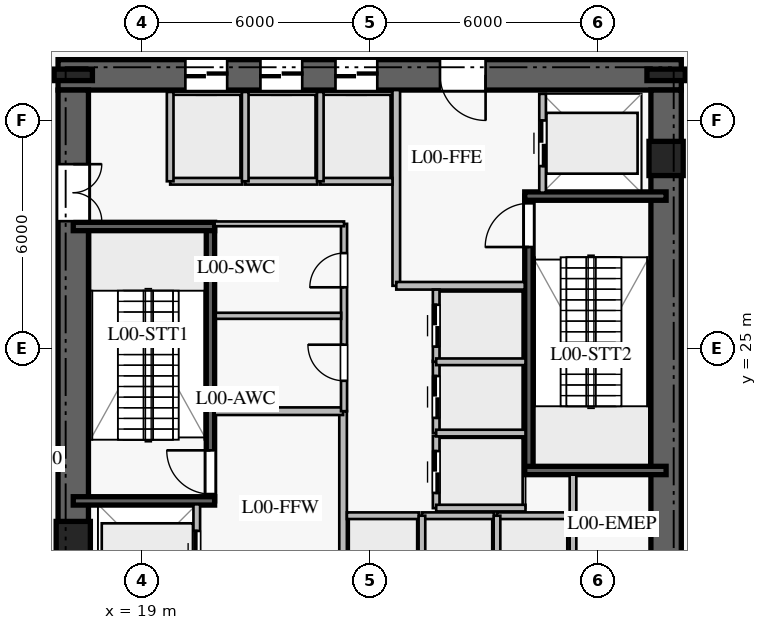
"""IFC4 building model, lengths in metres.
Left out: names, types, materials, properties, quantities, classifications, styles, units other than length and angle.
Written with IfcOpenShell. Run it as: python <this file> out.ifc"""

import sys

from ifc_helpers import new_model, si_unit, direction, frame, frame_2d, origin, origin_2d, place, context, subcontext, project, spatial, rectangle, i_section, extrude, element, fill, save


model = new_model("IFC4")
c1 = context("Model", 3, precision=1e-05, world=origin(), true_north=direction((0.0, 1.0)))
c2 = subcontext(c1, "Body", "Model", "MODEL_VIEW")
j1 = project(units=[si_unit("LENGTHUNIT", "METRE"), si_unit("PLANEANGLEUNIT", "RADIAN")], contexts=[c1])
p1 = place(None, origin())
s1 = spatial("IfcSite", under=j1, at=p1, CompositionType="ELEMENT")
p2 = place(p1, origin())
s2 = spatial("IfcBuilding", under=s1, at=p2, CompositionType="ELEMENT")
p3 = place(p2, origin())
s3 = spatial("IfcBuildingStorey", under=s2, at=p3, CompositionType="ELEMENT", Elevation=0.0)
p4 = place(p3, frame((33.2, 32.2, 0.0), z_axis=(0.0, 0.0, 1.0), x_axis=(-1.0, 0.0, 0.0)))
e1 = element("IfcWall", 1, at=p4, inside=s3, PredefinedType="SHEAR", context=c2, shape_type="SweptSolid", body=[
    extrude(rectangle(XDim=16.4, YDim=0.8, at=frame_2d((8.2, 0.0))), origin(), (0.0, 0.0, 1.0), 4.94),
])
p5 = place(p4, frame((5.15, 0.0, 0.0)))
e2 = element("IfcOpeningElement", 2, at=p5, cuts=e1, PredefinedType="OPENING", context=c2, shape_type="SweptSolid", body=[
    extrude(rectangle(XDim=1.2, YDim=2.25, at=frame_2d((0.6, 1.125))), frame((0.0, 0.41, 0.0), z_axis=(0.0, -1.0, 0.0), x_axis=(1.0, 0.0, 0.0)), (0.0, 0.0, 1.0), 0.82),
])
p6 = place(p4, frame((11.95, 0.0, 0.0)))
e3 = element("IfcOpeningElement", 3, at=p6, cuts=e1, PredefinedType="OPENING", context=c2, shape_type="SweptSolid", body=[
    extrude(rectangle(XDim=1.1, YDim=2.2, at=frame_2d((0.55, 1.1))), frame((0.0, 0.41, 0.0), z_axis=(0.0, -1.0, 0.0), x_axis=(1.0, 0.0, 0.0)), (0.0, 0.0, 1.0), 0.82),
])
p7 = place(p4, frame((9.975, 0.0, 0.0)))
e4 = element("IfcOpeningElement", 4, at=p7, cuts=e1, PredefinedType="OPENING", context=c2, shape_type="SweptSolid", body=[
    extrude(rectangle(XDim=1.1, YDim=2.2, at=frame_2d((0.55, 1.1))), frame((0.0, 0.41, 0.0), z_axis=(0.0, -1.0, 0.0), x_axis=(1.0, 0.0, 0.0)), (0.0, 0.0, 1.0), 0.82),
])
p8 = place(p4, frame((8.0, 0.0, 0.0)))
e5 = element("IfcOpeningElement", 5, at=p8, cuts=e1, PredefinedType="OPENING", context=c2, shape_type="SweptSolid", body=[
    extrude(rectangle(XDim=1.1, YDim=2.2, at=frame_2d((0.55, 1.1))), frame((0.0, 0.41, 0.0), z_axis=(0.0, -1.0, 0.0), x_axis=(1.0, 0.0, 0.0)), (0.0, 0.0, 1.0), 0.82),
])
p9 = place(p3, frame((17.2, 31.8, 0.0), z_axis=(0.0, 0.0, 1.0), x_axis=(0.0, -1.0, 0.0)))
e6 = element("IfcWall", 6, at=p9, inside=s3, PredefinedType="SHEAR", context=c2, shape_type="SweptSolid", body=[
    extrude(rectangle(XDim=13.6, YDim=0.8, at=frame_2d((6.8, 0.0))), origin(), (0.0, 0.0, 1.0), 4.94),
])
p10 = place(p9, frame((1.95, 0.0, 0.0)))
e7 = element("IfcOpeningElement", 7, at=p10, cuts=e6, PredefinedType="OPENING", context=c2, shape_type="SweptSolid", body=[
    extrude(rectangle(XDim=1.5, YDim=2.2, at=frame_2d((0.75, 1.1))), frame((0.0, 0.41, 0.0), z_axis=(0.0, -1.0, 0.0), x_axis=(1.0, 0.0, 0.0)), (0.0, 0.0, 1.0), 0.82),
])
p11 = place(p3, frame((32.8, 18.2, 0.0), z_axis=(0.0, 0.0, 1.0), x_axis=(0.0, 1.0, 0.0)))
e8 = element("IfcWall", 8, at=p11, inside=s3, PredefinedType="SHEAR", context=c2, shape_type="SweptSolid", body=[
    extrude(rectangle(XDim=13.6, YDim=0.8, at=frame_2d((6.8, 0.0))), origin(), (0.0, 0.0, 1.0), 4.94),
])
for number, where, z_axis, x_axis in (
    (9, (32.8, 32.2, 0.0), (0.0, 0.0, 1.0), (1.0, 0.0, 0.0)),
    (10, (17.2, 32.2, 0.0), (0.0, 0.0, 1.0), (1.0, 0.0, 0.0)),
):
    element("IfcColumn", number, at=place(p3, frame(where, z_axis=z_axis, x_axis=x_axis)), inside=s3, PredefinedType="COLUMN", context=c2, shape_type="SweptSolid", body=[
        extrude(i_section(OverallWidth=0.302, OverallDepth=1.008, WebThickness=0.021, FlangeThickness=0.04, at=origin_2d()), origin(), (0.0, 0.0, 1.0), 5.2),
    ])
p12 = place(p3, frame((20.81, 20.99, 0.0), z_axis=(0.0, 0.0, 1.0), x_axis=(0.0, 1.0, 0.0)))
e11 = element("IfcWall", 11, at=p12, inside=s3, PredefinedType="SOLIDWALL", context=c2, shape_type="SweptSolid", body=[
    extrude(rectangle(XDim=7.22, YDim=0.22, at=frame_2d((3.61, 0.0))), origin(), (0.0, 0.0, 1.0), 4.94),
])
p13 = place(p12, frame((0.18, 0.0, 0.0)))
e12 = element("IfcOpeningElement", 12, at=p13, cuts=e11, PredefinedType="OPENING", context=c2, shape_type="SweptSolid", body=[
    extrude(rectangle(XDim=1.15, YDim=2.2, at=frame_2d((0.575, 1.1))), frame((0.0, 0.12, 0.0), z_axis=(0.0, -1.0, 0.0), x_axis=(1.0, 0.0, 0.0)), (0.0, 0.0, 1.0), 0.24),
])
for number, where, z_axis, x_axis in (
    (13, (17.2, 20.99, 0.0), (0.0, 0.0, 1.0), (1.0, 0.0, 0.0)),
    (14, (17.2, 28.21, 0.0), (0.0, 0.0, 1.0), (1.0, 0.0, 0.0)),
):
    element("IfcWall", number, at=place(p3, frame(where, z_axis=z_axis, x_axis=x_axis)), inside=s3, PredefinedType="SOLIDWALL", context=c2, shape_type="SweptSolid", body=[
        extrude(rectangle(XDim=3.72, YDim=0.22, at=frame_2d((1.86, 0.0))), origin(), (0.0, 0.0, 1.0), 4.94),
    ])
p14 = place(p3, frame((29.19, 21.79, 0.0), z_axis=(0.0, 0.0, 1.0), x_axis=(0.0, 1.0, 0.0)))
e15 = element("IfcWall", 15, at=p14, inside=s3, PredefinedType="SOLIDWALL", context=c2, shape_type="SweptSolid", body=[
    extrude(rectangle(XDim=7.22, YDim=0.22, at=frame_2d((3.61, 0.0))), origin(), (0.0, 0.0, 1.0), 4.94),
])
p15 = place(p14, frame((5.88, 0.0, 0.0)))
e16 = element("IfcOpeningElement", 16, at=p15, cuts=e15, PredefinedType="OPENING", context=c2, shape_type="SweptSolid", body=[
    extrude(rectangle(XDim=1.15, YDim=2.2, at=frame_2d((0.575, 1.1))), frame((0.0, 0.12, 0.0), z_axis=(0.0, -1.0, 0.0), x_axis=(1.0, 0.0, 0.0)), (0.0, 0.0, 1.0), 0.24),
])
for number, where, z_axis, x_axis in (
    (17, (29.08, 21.79, 0.0), (0.0, 0.0, 1.0), (1.0, 0.0, 0.0)),
    (18, (29.08, 29.01, 0.0), (0.0, 0.0, 1.0), (1.0, 0.0, 0.0)),
):
    element("IfcWall", number, at=place(p3, frame(where, z_axis=z_axis, x_axis=x_axis)), inside=s3, PredefinedType="SOLIDWALL", context=c2, shape_type="SweptSolid", body=[
        extrude(rectangle(XDim=3.72, YDim=0.22, at=frame_2d((1.86, 0.0))), origin(), (0.0, 0.0, 1.0), 4.94),
    ])
for number, where, z_axis, x_axis in (
    (19, (17.2, 20.0, 0.0), (0.0, 0.0, 1.0), (1.0, 0.0, 0.0)),
    (20, (32.8, 30.0, 0.0), (0.0, 0.0, 1.0), (1.0, 0.0, 0.0)),
):
    element("IfcColumn", number, at=place(p3, frame(where, z_axis=z_axis, x_axis=x_axis)), inside=s3, PredefinedType="PILASTER", context=c2, shape_type="SweptSolid", body=[
        extrude(rectangle(XDim=0.9, YDim=0.9, at=origin_2d()), origin(), (0.0, 0.0, 1.0), 5.2),
    ])
p16 = place(p3, frame((24.3, 18.2, 0.0), z_axis=(0.0, 0.0, 1.0), x_axis=(0.0, 1.0, 0.0)))
e21 = element("IfcWall", 21, at=p16, inside=s3, PredefinedType="PARTITIONING", context=c2, shape_type="SweptSolid", body=[
    extrude(rectangle(XDim=5.15, YDim=0.2, at=frame_2d((2.575, 0.0))), origin(), (0.0, 0.0, 1.0), 4.94),
])
p17 = place(p3, frame((20.92, 23.35, 0.0), z_axis=(0.0, 0.0, 1.0), x_axis=(1.0, 0.0, 0.0)))
e22 = element("IfcWall", 22, at=p17, inside=s3, PredefinedType="PARTITIONING", context=c2, shape_type="SweptSolid", body=[
    extrude(rectangle(XDim=3.38, YDim=0.2, at=frame_2d((1.69, 0.0))), origin(), (0.0, 0.0, 1.0), 4.94),
])
p18 = place(p3, frame((25.7, 26.65, 0.0), z_axis=(0.0, 0.0, 1.0), x_axis=(0.0, 1.0, 0.0)))
e23 = element("IfcWall", 23, at=p18, inside=s3, PredefinedType="PARTITIONING", context=c2, shape_type="SweptSolid", body=[
    extrude(rectangle(XDim=5.15, YDim=0.2, at=frame_2d((2.575, 0.0))), origin(), (0.0, 0.0, 1.0), 4.94),
])
p19 = place(p3, frame((25.7, 26.65, 0.0), z_axis=(0.0, 0.0, 1.0), x_axis=(1.0, 0.0, 0.0)))
e24 = element("IfcWall", 24, at=p19, inside=s3, PredefinedType="PARTITIONING", context=c2, shape_type="SweptSolid", body=[
    extrude(rectangle(XDim=3.38, YDim=0.2, at=frame_2d((1.69, 0.0))), origin(), (0.0, 0.0, 1.0), 4.94),
])
p20 = place(p3, frame((24.325, 23.35, 0.0), z_axis=(0.0, 0.0, 1.0), x_axis=(0.0, 1.0, 0.0)))
e25 = element("IfcWall", 25, at=p20, inside=s3, PredefinedType="PLUMBINGWALL", context=c2, shape_type="SweptSolid", body=[
    extrude(rectangle(XDim=4.93, YDim=0.16, at=frame_2d((2.465, 0.0))), origin(), (0.0, 0.0, 1.0), 4.94),
])
p21 = place(p20, frame((0.8, 0.0, 0.0)))
e26 = element("IfcOpeningElement", 26, at=p21, cuts=e25, PredefinedType="OPENING", context=c2, shape_type="SweptSolid", body=[
    extrude(rectangle(XDim=0.95, YDim=2.1, at=frame_2d((0.475, 1.05))), frame((0.0, 0.09, 0.0), z_axis=(0.0, -1.0, 0.0), x_axis=(1.0, 0.0, 0.0)), (0.0, 0.0, 1.0), 0.18),
])
p22 = place(p20, frame((3.26, 0.0, 0.0)))
e27 = element("IfcOpeningElement", 27, at=p22, cuts=e25, PredefinedType="OPENING", context=c2, shape_type="SweptSolid", body=[
    extrude(rectangle(XDim=0.9, YDim=2.1, at=frame_2d((0.45, 1.05))), frame((0.0, 0.09, 0.0), z_axis=(0.0, -1.0, 0.0), x_axis=(1.0, 0.0, 0.0)), (0.0, 0.0, 1.0), 0.18),
])
p23 = place(p3, frame((20.92, 28.28, 0.0), z_axis=(0.0, 0.0, 1.0), x_axis=(1.0, 0.0, 0.0)))
e28 = element("IfcWall", 28, at=p23, inside=s3, PredefinedType="PARTITIONING", context=c2, shape_type="SweptSolid", body=[
    extrude(rectangle(XDim=3.405, YDim=0.125, at=frame_2d((1.703, 0.0))), origin(), (0.0, 0.0, 1.0), 4.94),
])
p24 = place(p3, frame((20.95, 25.86, 0.0), z_axis=(0.0, 0.0, 1.0), x_axis=(1.0, 0.0, 0.0)))
e29 = element("IfcWall", 29, at=p24, inside=s3, PredefinedType="PLUMBINGWALL", context=c2, shape_type="SweptSolid", body=[
    extrude(rectangle(XDim=3.3, YDim=0.16, at=frame_2d((1.65, 0.0))), origin(), (0.0, 0.0, 1.0), 4.94),
])
p25 = place(p3, frame((30.35, 18.2, 0.0), z_axis=(0.0, 0.0, 1.0), x_axis=(0.0, 1.0, 0.0)))
e30 = element("IfcWall", 30, at=p25, inside=s3, PredefinedType="PARTITIONING", context=c2, shape_type="SweptSolid", body=[
    extrude(rectangle(XDim=3.48, YDim=0.175, at=frame_2d((1.74, 0.0))), origin(), (0.0, 0.0, 1.0), 4.94),
])
p26 = place(p3, frame((24.4, 20.6, 0.0), z_axis=(0.0, 0.0, 1.0), x_axis=(1.0, 0.0, 0.0)))
e31 = element("IfcWall", 31, at=p26, inside=s3, PredefinedType="PARTITIONING", context=c2, shape_type="SweptSolid", body=[
    extrude(rectangle(XDim=1.9, YDim=0.175, at=frame_2d((0.95, 0.0))), origin(), (0.0, 0.0, 1.0), 4.94),
])
p27 = place(p3, frame((26.375, 20.6, 0.0), z_axis=(0.0, 0.0, 1.0), x_axis=(1.0, 0.0, 0.0)))
e32 = element("IfcWall", 32, at=p27, inside=s3, PredefinedType="PARTITIONING", context=c2, shape_type="SweptSolid", body=[
    extrude(rectangle(XDim=1.9, YDim=0.175, at=frame_2d((0.95, 0.0))), origin(), (0.0, 0.0, 1.0), 4.94),
])
p28 = place(p3, frame((26.375, 18.25, 0.0), z_axis=(0.0, 0.0, 1.0), x_axis=(0.0, 1.0, 0.0)))
e33 = element("IfcWall", 33, at=p28, inside=s3, PredefinedType="PARTITIONING", context=c2, shape_type="SweptSolid", body=[
    extrude(rectangle(XDim=2.35, YDim=0.175, at=frame_2d((1.175, 0.0))), origin(), (0.0, 0.0, 1.0), 4.94),
])
p29 = place(p3, frame((28.35, 20.6, 0.0), z_axis=(0.0, 0.0, 1.0), x_axis=(1.0, 0.0, 0.0)))
e34 = element("IfcWall", 34, at=p29, inside=s3, PredefinedType="PARTITIONING", context=c2, shape_type="SweptSolid", body=[
    extrude(rectangle(XDim=1.9, YDim=0.175, at=frame_2d((0.95, 0.0))), origin(), (0.0, 0.0, 1.0), 4.94),
])
p30 = place(p3, frame((28.35, 18.25, 0.0), z_axis=(0.0, 0.0, 1.0), x_axis=(0.0, 1.0, 0.0)))
e35 = element("IfcWall", 35, at=p30, inside=s3, PredefinedType="PARTITIONING", context=c2, shape_type="SweptSolid", body=[
    extrude(rectangle(XDim=2.35, YDim=0.175, at=frame_2d((1.175, 0.0))), origin(), (0.0, 0.0, 1.0), 4.94),
])
p31 = place(p3, frame((19.75, 29.4, 0.0), z_axis=(0.0, 0.0, 1.0), x_axis=(1.0, 0.0, 0.0)))
e36 = element("IfcWall", 36, at=p31, inside=s3, PredefinedType="PARTITIONING", context=c2, shape_type="SweptSolid", body=[
    extrude(rectangle(XDim=1.9, YDim=0.175, at=frame_2d((0.95, 0.0))), origin(), (0.0, 0.0, 1.0), 4.94),
])
p32 = place(p3, frame((19.75, 29.4, 0.0), z_axis=(0.0, 0.0, 1.0), x_axis=(0.0, 1.0, 0.0)))
e37 = element("IfcWall", 37, at=p32, inside=s3, PredefinedType="PARTITIONING", context=c2, shape_type="SweptSolid", body=[
    extrude(rectangle(XDim=2.35, YDim=0.175, at=frame_2d((1.175, 0.0))), origin(), (0.0, 0.0, 1.0), 4.94),
])
p33 = place(p3, frame((21.725, 29.4, 0.0), z_axis=(0.0, 0.0, 1.0), x_axis=(1.0, 0.0, 0.0)))
e38 = element("IfcWall", 38, at=p33, inside=s3, PredefinedType="PARTITIONING", context=c2, shape_type="SweptSolid", body=[
    extrude(rectangle(XDim=1.9, YDim=0.175, at=frame_2d((0.95, 0.0))), origin(), (0.0, 0.0, 1.0), 4.94),
])
p34 = place(p3, frame((21.725, 29.4, 0.0), z_axis=(0.0, 0.0, 1.0), x_axis=(0.0, 1.0, 0.0)))
e39 = element("IfcWall", 39, at=p34, inside=s3, PredefinedType="PARTITIONING", context=c2, shape_type="SweptSolid", body=[
    extrude(rectangle(XDim=2.35, YDim=0.175, at=frame_2d((1.175, 0.0))), origin(), (0.0, 0.0, 1.0), 4.94),
])
p35 = place(p3, frame((23.7, 29.4, 0.0), z_axis=(0.0, 0.0, 1.0), x_axis=(1.0, 0.0, 0.0)))
e40 = element("IfcWall", 40, at=p35, inside=s3, PredefinedType="PARTITIONING", context=c2, shape_type="SweptSolid", body=[
    extrude(rectangle(XDim=1.9, YDim=0.175, at=frame_2d((0.95, 0.0))), origin(), (0.0, 0.0, 1.0), 4.94),
])
p36 = place(p3, frame((23.7, 29.4, 0.0), z_axis=(0.0, 0.0, 1.0), x_axis=(0.0, 1.0, 0.0)))
e41 = element("IfcWall", 41, at=p36, inside=s3, PredefinedType="PARTITIONING", context=c2, shape_type="SweptSolid", body=[
    extrude(rectangle(XDim=2.35, YDim=0.175, at=frame_2d((1.175, 0.0))), origin(), (0.0, 0.0, 1.0), 4.94),
])
p37 = place(p3, frame((26.75, 20.8, 0.0), z_axis=(0.0, 0.0, 1.0), x_axis=(0.0, 1.0, 0.0)))
e42 = element("IfcWall", 42, at=p37, inside=s3, PredefinedType="PARTITIONING", context=c2, shape_type="SweptSolid", body=[
    extrude(rectangle(XDim=1.9, YDim=0.175, at=frame_2d((0.95, 0.0))), origin(), (0.0, 0.0, 1.0), 4.94),
])
p38 = place(p37, frame((0.4, 0.0, 0.0)))
e43 = element("IfcOpeningElement", 43, at=p38, cuts=e42, PredefinedType="OPENING", context=c2, shape_type="SweptSolid", body=[
    extrude(rectangle(XDim=1.1, YDim=2.2, at=frame_2d((0.55, 1.1))), frame((0.0, 0.098, 0.0), z_axis=(0.0, -1.0, 0.0), x_axis=(1.0, 0.0, 0.0)), (0.0, 0.0, 1.0), 0.195),
])
p39 = place(p3, frame((26.75, 20.8, 0.0), z_axis=(0.0, 0.0, 1.0), x_axis=(1.0, 0.0, 0.0)))
e44 = element("IfcWall", 44, at=p39, inside=s3, PredefinedType="PARTITIONING", context=c2, shape_type="SweptSolid", body=[
    extrude(rectangle(XDim=2.35, YDim=0.175, at=frame_2d((1.175, 0.0))), origin(), (0.0, 0.0, 1.0), 4.94),
])
p40 = place(p3, frame((26.75, 22.775, 0.0), z_axis=(0.0, 0.0, 1.0), x_axis=(0.0, 1.0, 0.0)))
e45 = element("IfcWall", 45, at=p40, inside=s3, PredefinedType="PARTITIONING", context=c2, shape_type="SweptSolid", body=[
    extrude(rectangle(XDim=1.9, YDim=0.175, at=frame_2d((0.95, 0.0))), origin(), (0.0, 0.0, 1.0), 4.94),
])
p41 = place(p40, frame((0.4, 0.0, 0.0)))
e46 = element("IfcOpeningElement", 46, at=p41, cuts=e45, PredefinedType="OPENING", context=c2, shape_type="SweptSolid", body=[
    extrude(rectangle(XDim=1.1, YDim=2.2, at=frame_2d((0.55, 1.1))), frame((0.0, 0.098, 0.0), z_axis=(0.0, -1.0, 0.0), x_axis=(1.0, 0.0, 0.0)), (0.0, 0.0, 1.0), 0.195),
])
p42 = place(p3, frame((26.75, 22.775, 0.0), z_axis=(0.0, 0.0, 1.0), x_axis=(1.0, 0.0, 0.0)))
e47 = element("IfcWall", 47, at=p42, inside=s3, PredefinedType="PARTITIONING", context=c2, shape_type="SweptSolid", body=[
    extrude(rectangle(XDim=2.35, YDim=0.175, at=frame_2d((1.175, 0.0))), origin(), (0.0, 0.0, 1.0), 4.94),
])
p43 = place(p3, frame((26.75, 24.65, 0.0), z_axis=(0.0, 0.0, 1.0), x_axis=(0.0, 1.0, 0.0)))
e48 = element("IfcWall", 48, at=p43, inside=s3, PredefinedType="PARTITIONING", context=c2, shape_type="SweptSolid", body=[
    extrude(rectangle(XDim=1.9, YDim=0.175, at=frame_2d((0.95, 0.0))), origin(), (0.0, 0.0, 1.0), 4.94),
])
p44 = place(p43, frame((0.4, 0.0, 0.0)))
e49 = element("IfcOpeningElement", 49, at=p44, cuts=e48, PredefinedType="OPENING", context=c2, shape_type="SweptSolid", body=[
    extrude(rectangle(XDim=1.1, YDim=2.2, at=frame_2d((0.55, 1.1))), frame((0.0, 0.098, 0.0), z_axis=(0.0, -1.0, 0.0), x_axis=(1.0, 0.0, 0.0)), (0.0, 0.0, 1.0), 0.195),
])
p45 = place(p3, frame((26.75, 24.65, 0.0), z_axis=(0.0, 0.0, 1.0), x_axis=(1.0, 0.0, 0.0)))
e50 = element("IfcWall", 50, at=p45, inside=s3, PredefinedType="PARTITIONING", context=c2, shape_type="SweptSolid", body=[
    extrude(rectangle(XDim=2.35, YDim=0.175, at=frame_2d((1.175, 0.0))), origin(), (0.0, 0.0, 1.0), 4.94),
])
p46 = place(p3, frame((20.45, 18.3, 0.0), z_axis=(0.0, 0.0, 1.0), x_axis=(0.0, 1.0, 0.0)))
e51 = element("IfcWall", 51, at=p46, inside=s3, PredefinedType="PARTITIONING", context=c2, shape_type="SweptSolid", body=[
    extrude(rectangle(XDim=2.6, YDim=0.175, at=frame_2d((1.3, 0.0))), origin(), (0.0, 0.0, 1.0), 4.94),
])
p47 = place(p46, frame((0.7, 0.0, 0.0)))
e52 = element("IfcOpeningElement", 52, at=p47, cuts=e51, PredefinedType="OPENING", context=c2, shape_type="SweptSolid", body=[
    extrude(rectangle(XDim=1.2, YDim=2.2, at=frame_2d((0.6, 1.1))), frame((0.0, 0.098, 0.0), z_axis=(0.0, -1.0, 0.0), x_axis=(1.0, 0.0, 0.0)), (0.0, 0.0, 1.0), 0.195),
])
p48 = place(p3, frame((29.55, 29.1, 0.0), z_axis=(0.0, 0.0, 1.0), x_axis=(0.0, 1.0, 0.0)))
e53 = element("IfcWall", 53, at=p48, inside=s3, PredefinedType="PARTITIONING", context=c2, shape_type="SweptSolid", body=[
    extrude(rectangle(XDim=2.6, YDim=0.175, at=frame_2d((1.3, 0.0))), origin(), (0.0, 0.0, 1.0), 4.94),
])
p49 = place(p48, frame((0.7, 0.0, 0.0)))
e54 = element("IfcOpeningElement", 54, at=p49, cuts=e53, PredefinedType="OPENING", context=c2, shape_type="SweptSolid", body=[
    extrude(rectangle(XDim=1.2, YDim=2.2, at=frame_2d((0.6, 1.1))), frame((0.0, 0.098, 0.0), z_axis=(0.0, -1.0, 0.0), x_axis=(1.0, 0.0, 0.0)), (0.0, 0.0, 1.0), 0.195),
])
p50 = place(p13, origin())
e55 = element("IfcDoor", 55, at=p50, inside=s3, OperationType="SINGLE_SWING_RIGHT", PredefinedType="DOOR", context=c2, shape_type="SweptSolid", body=[
    extrude(rectangle(XDim=1.15, YDim=2.2, at=frame_2d((0.575, 1.1))), frame((0.0, 0.025, 0.0), z_axis=(0.0, -1.0, 0.0), x_axis=(1.0, 0.0, 0.0)), (0.0, 0.0, 1.0), 0.05),
])
fill(e12, e55)
p51 = place(p15, origin())
e56 = element("IfcDoor", 56, at=p51, inside=s3, OperationType="SINGLE_SWING_LEFT", PredefinedType="DOOR", context=c2, shape_type="SweptSolid", body=[
    extrude(rectangle(XDim=1.15, YDim=2.2, at=frame_2d((0.575, 1.1))), frame((0.0, 0.025, 0.0), z_axis=(0.0, -1.0, 0.0), x_axis=(1.0, 0.0, 0.0)), (0.0, 0.0, 1.0), 0.05),
])
fill(e16, e56)
p52 = place(p5, origin())
e57 = element("IfcDoor", 57, at=p52, inside=s3, OperationType="SINGLE_SWING_LEFT", PredefinedType="DOOR", context=c2, shape_type="SweptSolid", body=[
    extrude(rectangle(XDim=1.2, YDim=2.25, at=frame_2d((0.6, 1.125))), frame((0.0, 0.025, 0.0), z_axis=(0.0, -1.0, 0.0), x_axis=(1.0, 0.0, 0.0)), (0.0, 0.0, 1.0), 0.05),
])
fill(e2, e57)
p53 = place(p10, origin())
e58 = element("IfcDoor", 58, at=p53, inside=s3, OperationType="DOUBLE_DOOR_SINGLE_SWING", PredefinedType="DOOR", context=c2, shape_type="SweptSolid", body=[
    extrude(rectangle(XDim=1.5, YDim=2.2, at=frame_2d((0.75, 1.1))), frame((0.0, 0.025, 0.0), z_axis=(0.0, -1.0, 0.0), x_axis=(1.0, 0.0, 0.0)), (0.0, 0.0, 1.0), 0.05),
])
fill(e7, e58)
p54 = place(p21, origin())
e59 = element("IfcDoor", 59, at=p54, inside=s3, OperationType="SINGLE_SWING_RIGHT", PredefinedType="DOOR", context=c2, shape_type="SweptSolid", body=[
    extrude(rectangle(XDim=0.95, YDim=2.1, at=frame_2d((0.475, 1.05))), frame((0.0, 0.025, 0.0), z_axis=(0.0, -1.0, 0.0), x_axis=(1.0, 0.0, 0.0)), (0.0, 0.0, 1.0), 0.05),
])
fill(e26, e59)
p55 = place(p22, origin())
e60 = element("IfcDoor", 60, at=p55, inside=s3, OperationType="SINGLE_SWING_LEFT", PredefinedType="DOOR", context=c2, shape_type="SweptSolid", body=[
    extrude(rectangle(XDim=0.9, YDim=2.1, at=frame_2d((0.45, 1.05))), frame((0.0, 0.025, 0.0), z_axis=(0.0, -1.0, 0.0), x_axis=(1.0, 0.0, 0.0)), (0.0, 0.0, 1.0), 0.05),
])
fill(e27, e60)
p56 = place(p6, origin())
e61 = element("IfcDoor", 61, at=p56, inside=s3, OperationType="DOUBLE_DOOR_SLIDING", PredefinedType="DOOR", context=c2, shape_type="SweptSolid", body=[
    extrude(rectangle(XDim=1.1, YDim=2.2, at=frame_2d((0.55, 1.1))), frame((0.0, 0.025, 0.0), z_axis=(0.0, -1.0, 0.0), x_axis=(1.0, 0.0, 0.0)), (0.0, 0.0, 1.0), 0.05),
])
fill(e3, e61)
p57 = place(p7, origin())
e62 = element("IfcDoor", 62, at=p57, inside=s3, OperationType="DOUBLE_DOOR_SLIDING", PredefinedType="DOOR", context=c2, shape_type="SweptSolid", body=[
    extrude(rectangle(XDim=1.1, YDim=2.2, at=frame_2d((0.55, 1.1))), frame((0.0, 0.025, 0.0), z_axis=(0.0, -1.0, 0.0), x_axis=(1.0, 0.0, 0.0)), (0.0, 0.0, 1.0), 0.05),
])
fill(e4, e62)
p58 = place(p8, origin())
e63 = element("IfcDoor", 63, at=p58, inside=s3, OperationType="DOUBLE_DOOR_SLIDING", PredefinedType="DOOR", context=c2, shape_type="SweptSolid", body=[
    extrude(rectangle(XDim=1.1, YDim=2.2, at=frame_2d((0.55, 1.1))), frame((0.0, 0.025, 0.0), z_axis=(0.0, -1.0, 0.0), x_axis=(1.0, 0.0, 0.0)), (0.0, 0.0, 1.0), 0.05),
])
fill(e5, e63)
p59 = place(p38, origin())
e64 = element("IfcDoor", 64, at=p59, inside=s3, OperationType="DOUBLE_DOOR_SLIDING", PredefinedType="DOOR", context=c2, shape_type="SweptSolid", body=[
    extrude(rectangle(XDim=1.1, YDim=2.2, at=frame_2d((0.55, 1.1))), frame((0.0, 0.025, 0.0), z_axis=(0.0, -1.0, 0.0), x_axis=(1.0, 0.0, 0.0)), (0.0, 0.0, 1.0), 0.05),
])
fill(e43, e64)
p60 = place(p41, origin())
e65 = element("IfcDoor", 65, at=p60, inside=s3, OperationType="DOUBLE_DOOR_SLIDING", PredefinedType="DOOR", context=c2, shape_type="SweptSolid", body=[
    extrude(rectangle(XDim=1.1, YDim=2.2, at=frame_2d((0.55, 1.1))), frame((0.0, 0.025, 0.0), z_axis=(0.0, -1.0, 0.0), x_axis=(1.0, 0.0, 0.0)), (0.0, 0.0, 1.0), 0.05),
])
fill(e46, e65)
p61 = place(p44, origin())
e66 = element("IfcDoor", 66, at=p61, inside=s3, OperationType="DOUBLE_DOOR_SLIDING", PredefinedType="DOOR", context=c2, shape_type="SweptSolid", body=[
    extrude(rectangle(XDim=1.1, YDim=2.2, at=frame_2d((0.55, 1.1))), frame((0.0, 0.025, 0.0), z_axis=(0.0, -1.0, 0.0), x_axis=(1.0, 0.0, 0.0)), (0.0, 0.0, 1.0), 0.05),
])
fill(e49, e66)
p62 = place(p47, origin())
e67 = element("IfcDoor", 67, at=p62, inside=s3, OperationType="DOUBLE_DOOR_SLIDING", PredefinedType="DOOR", context=c2, shape_type="SweptSolid", body=[
    extrude(rectangle(XDim=1.2, YDim=2.2, at=frame_2d((0.6, 1.1))), frame((0.0, 0.025, 0.0), z_axis=(0.0, -1.0, 0.0), x_axis=(1.0, 0.0, 0.0)), (0.0, 0.0, 1.0), 0.05),
])
fill(e52, e67)
p63 = place(p49, origin())
e68 = element("IfcDoor", 68, at=p63, inside=s3, OperationType="DOUBLE_DOOR_SLIDING", PredefinedType="DOOR", context=c2, shape_type="SweptSolid", body=[
    extrude(rectangle(XDim=1.2, YDim=2.2, at=frame_2d((0.6, 1.1))), frame((0.0, 0.025, 0.0), z_axis=(0.0, -1.0, 0.0), x_axis=(1.0, 0.0, 0.0)), (0.0, 0.0, 1.0), 0.05),
])
fill(e54, e68)
save(model, sys.argv[1])
